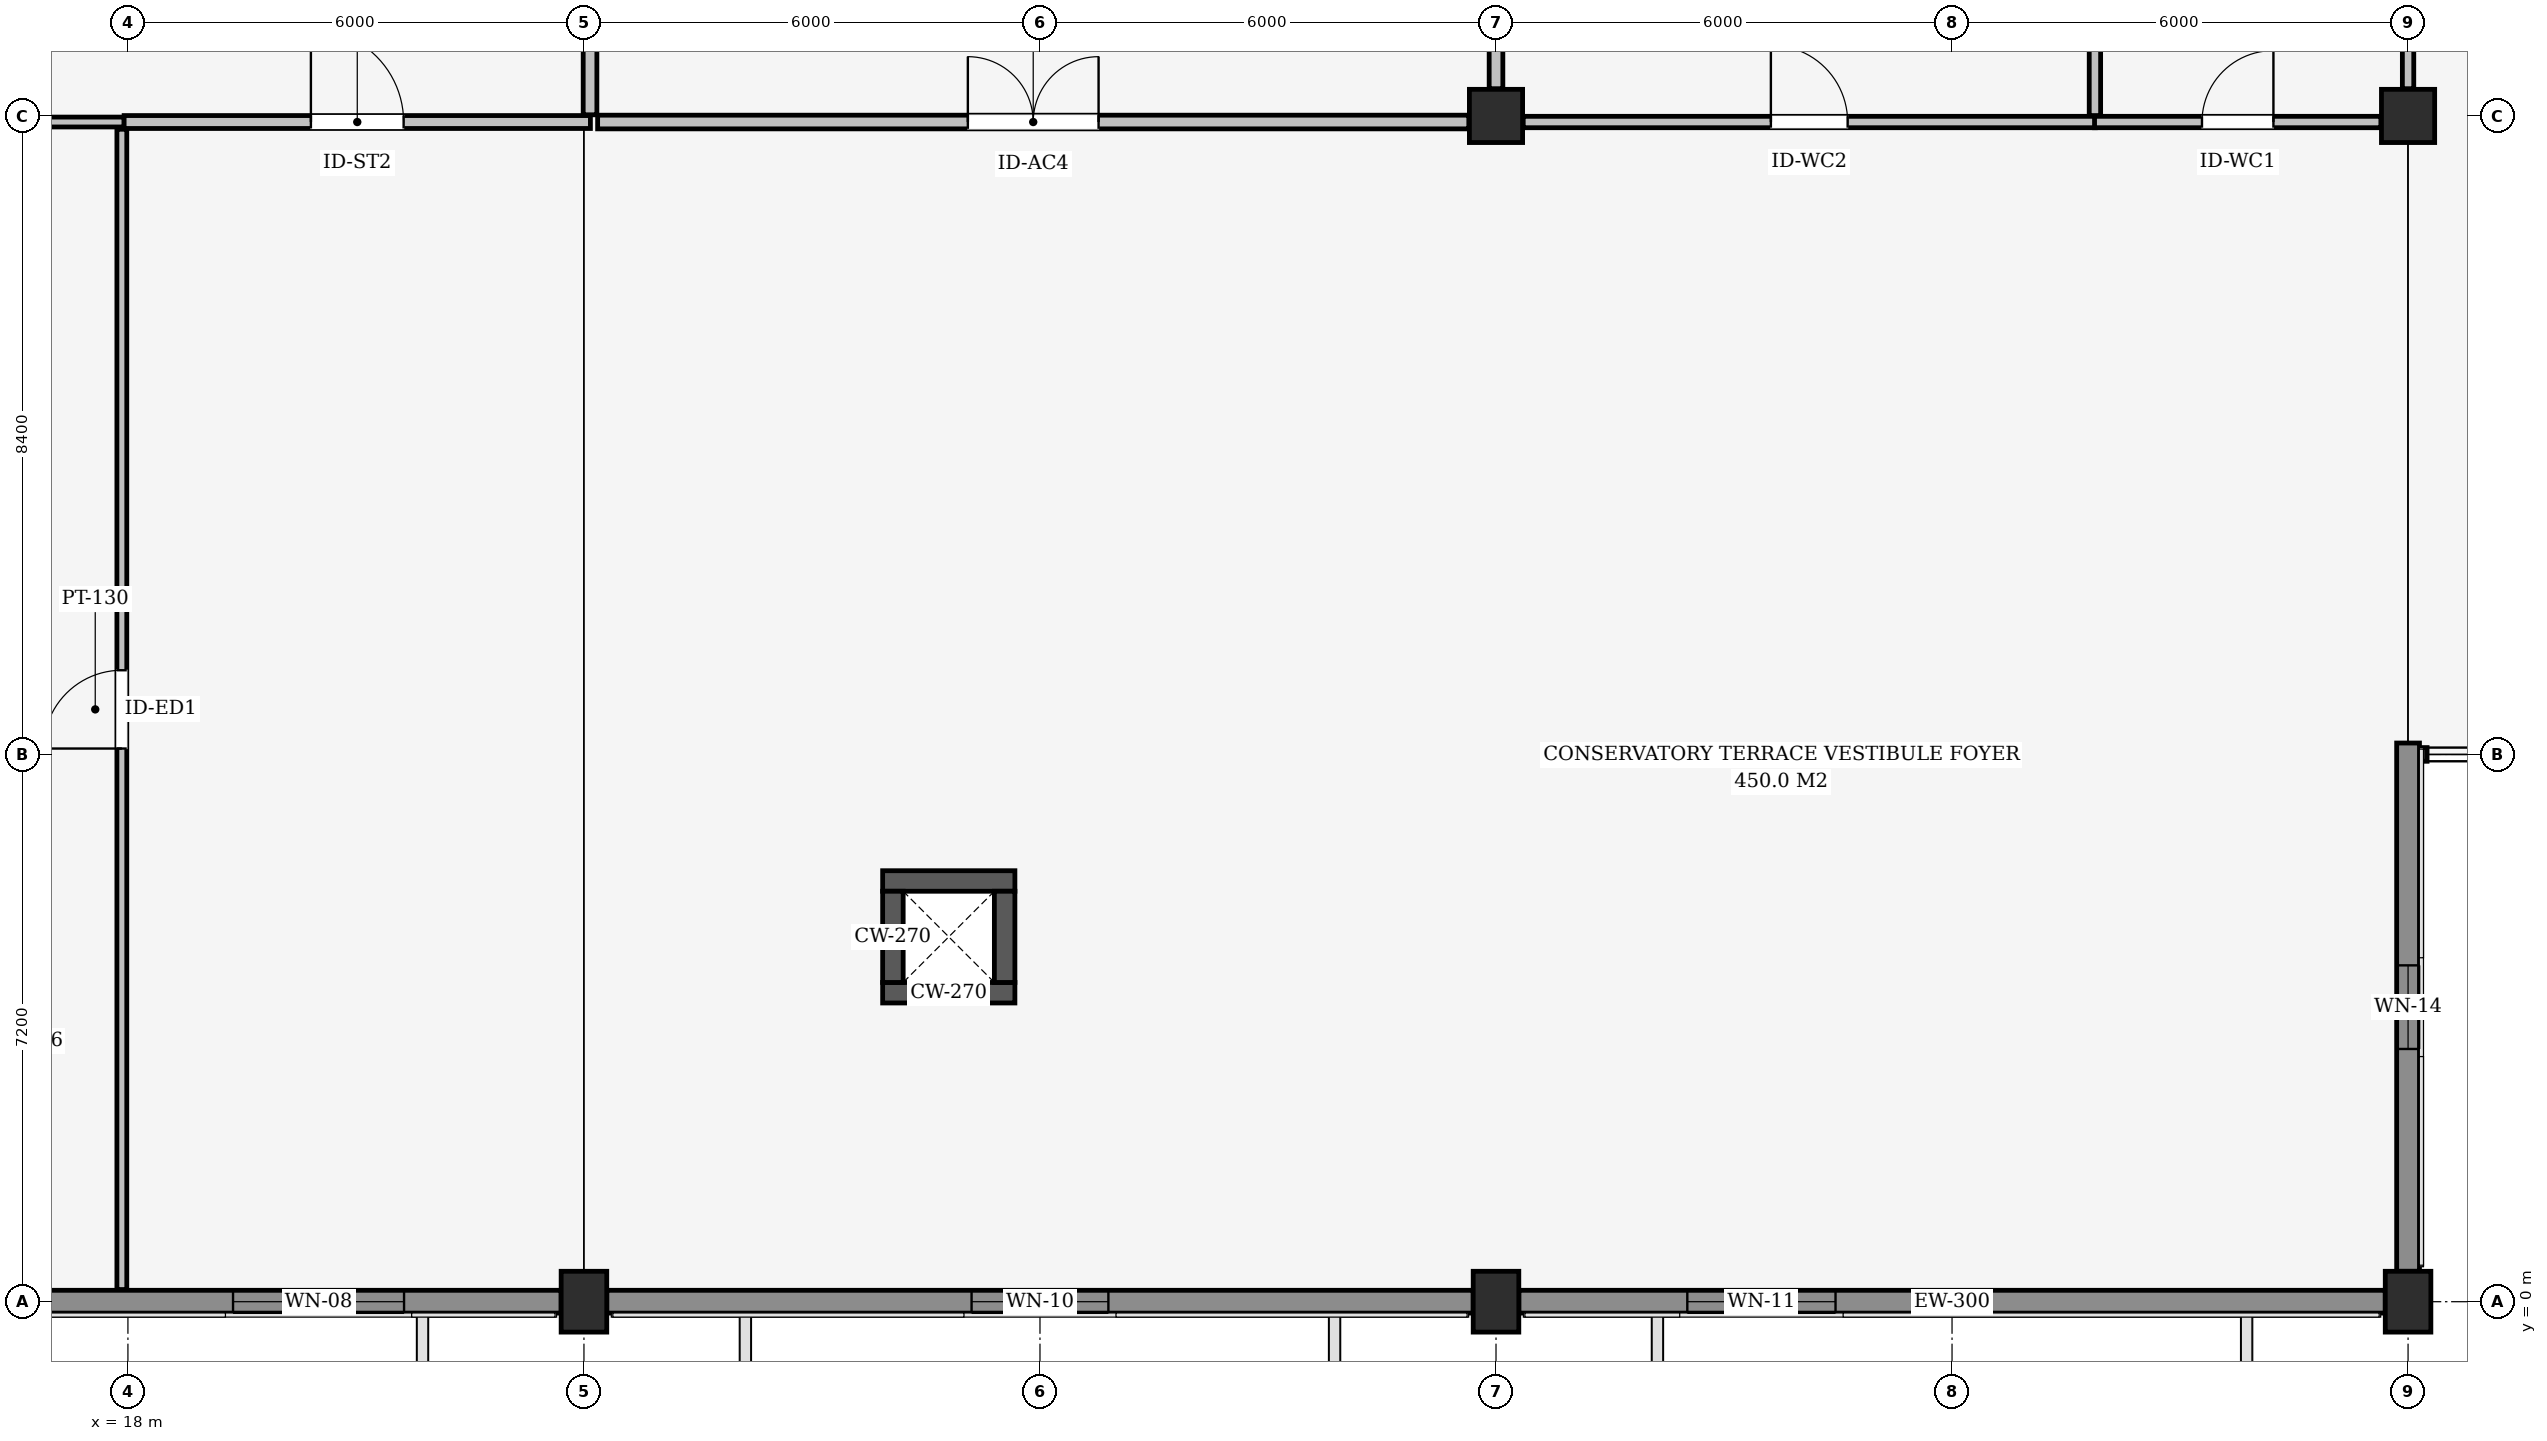
"""IFC4 building model, lengths in metres.
Left out: names, types, materials, properties, quantities, classifications, styles, units other than length and angle.
Written with IfcOpenShell. Run it as: python <this file> out.ifc"""

import sys

from ifc_helpers import new_model, si_unit, direction, frame, frame_2d, origin, origin_2d, place, context, subcontext, project, spatial, rectangle, extrude, element, fill, save


model = new_model("IFC4")
c1 = context("Model", 3, precision=1e-05, world=origin(), true_north=direction((0.0, 1.0)))
c2 = subcontext(c1, "Body", "Model", "MODEL_VIEW")
j1 = project(units=[si_unit("LENGTHUNIT", "METRE"), si_unit("PLANEANGLEUNIT", "RADIAN")], contexts=[c1])
p1 = place(None, origin())
s1 = spatial("IfcSite", under=j1, at=p1, CompositionType="ELEMENT")
p2 = place(p1, origin())
s2 = spatial("IfcBuilding", under=s1, at=p2, CompositionType="ELEMENT")
p3 = place(p2, frame((0.0, 0.0, 9.3)))
s3 = spatial("IfcBuildingStorey", under=s2, at=p3, CompositionType="ELEMENT", Elevation=9.3)
for number, where, z_axis, x_axis in (
    (1, (24.0, 0.0, 0.0), (0.0, 0.0, 1.0), (1.0, 0.0, 0.0)),
    (2, (36.0, 0.0, 0.0), (0.0, 0.0, 1.0), (1.0, 0.0, 0.0)),
    (3, (48.0, 0.0, 0.0), (0.0, 0.0, 1.0), (1.0, 0.0, 0.0)),
):
    element("IfcColumn", number, at=place(p3, frame(where, z_axis=z_axis, x_axis=x_axis)), inside=s3, PredefinedType="COLUMN", context=c2, shape_type="SweptSolid", body=[
        extrude(rectangle(XDim=0.6, YDim=0.8, at=origin_2d()), origin(), (0.0, 0.0, 1.0), 4.5),
    ])
for number, where, z_axis, x_axis in (
    (4, (36.0, 15.6, 0.0), (0.0, 0.0, 1.0), (1.0, 0.0, 0.0)),
    (5, (48.0, 15.6, 0.0), (0.0, 0.0, 1.0), (1.0, 0.0, 0.0)),
):
    element("IfcColumn", number, at=place(p3, frame(where, z_axis=z_axis, x_axis=x_axis)), inside=s3, PredefinedType="COLUMN", context=c2, shape_type="SweptSolid", body=[
        extrude(rectangle(XDim=0.7, YDim=0.7, at=origin_2d()), origin(), (0.0, 0.0, 1.0), 4.5),
    ])
p4 = place(p3, frame((23.7, 0.0, 0.0), z_axis=(0.0, 0.0, 1.0), x_axis=(-1.0, 0.0, 0.0)))
e6 = element("IfcWall", 6, at=p4, inside=s3, PredefinedType="SOLIDWALL", context=c2, shape_type="SweptSolid", body=[
    extrude(rectangle(XDim=11.4, YDim=0.3, at=frame_2d((5.7, 0.0))), origin(), (0.0, 0.0, 1.0), 3.873),
])
p5 = place(p4, frame((2.067, 0.0, 0.85)))
e7 = element("IfcOpeningElement", 7, at=p5, cuts=e6, PredefinedType="OPENING", context=c2, shape_type="SweptSolid", body=[
    extrude(rectangle(XDim=2.25, YDim=1.95, at=frame_2d((1.125, 0.975))), frame((0.0, 0.16, 0.0), z_axis=(0.0, -1.0, 0.0), x_axis=(1.0, 0.0, 0.0)), (0.0, 0.0, 1.0), 0.32),
])
p6 = place(p3, frame((35.7, 0.0, 0.0), z_axis=(0.0, 0.0, 1.0), x_axis=(-1.0, 0.0, 0.0)))
e8 = element("IfcWall", 8, at=p6, inside=s3, PredefinedType="SOLIDWALL", context=c2, shape_type="SweptSolid", body=[
    extrude(rectangle(XDim=11.4, YDim=0.3, at=frame_2d((5.7, 0.0))), origin(), (0.0, 0.0, 1.0), 3.873),
])
p7 = place(p6, frame((4.8, 0.0, 0.85)))
e9 = element("IfcOpeningElement", 9, at=p7, cuts=e8, PredefinedType="OPENING", context=c2, shape_type="SweptSolid", body=[
    extrude(rectangle(XDim=1.8, YDim=0.95, at=frame_2d((0.9, 0.475))), frame((0.0, 0.16, 0.0), z_axis=(0.0, -1.0, 0.0), x_axis=(1.0, 0.0, 0.0)), (0.0, 0.0, 1.0), 0.32),
])
p8 = place(p3, frame((47.7, 0.0, 0.0), z_axis=(0.0, 0.0, 1.0), x_axis=(-1.0, 0.0, 0.0)))
e10 = element("IfcWall", 10, at=p8, inside=s3, PredefinedType="SOLIDWALL", context=c2, shape_type="SweptSolid", body=[
    extrude(rectangle(XDim=11.4, YDim=0.3, at=frame_2d((5.7, 0.0))), origin(), (0.0, 0.0, 1.0), 3.873),
])
p9 = place(p8, frame((7.233, 0.0, 0.85)))
e11 = element("IfcOpeningElement", 11, at=p9, cuts=e10, PredefinedType="OPENING", context=c2, shape_type="SweptSolid", body=[
    extrude(rectangle(XDim=1.95, YDim=1.75, at=frame_2d((0.975, 0.875))), frame((0.0, 0.16, 0.0), z_axis=(0.0, -1.0, 0.0), x_axis=(1.0, 0.0, 0.0)), (0.0, 0.0, 1.0), 0.32),
])
p10 = place(p3, frame((48.0, 7.35, 0.0), z_axis=(0.0, 0.0, 1.0), x_axis=(0.0, -1.0, 0.0)))
e12 = element("IfcWall", 12, at=p10, inside=s3, PredefinedType="SOLIDWALL", context=c2, shape_type="SweptSolid", body=[
    extrude(rectangle(XDim=6.95, YDim=0.3, at=frame_2d((3.475, 0.0))), origin(), (0.0, 0.0, 1.0), 3.504),
])
p11 = place(p10, frame((2.925, 0.0, 0.6)))
e13 = element("IfcOpeningElement", 13, at=p11, cuts=e12, PredefinedType="OPENING", context=c2, shape_type="SweptSolid", body=[
    extrude(rectangle(XDim=1.1, YDim=2.4, at=frame_2d((0.55, 1.2))), frame((0.0, 0.16, 0.0), z_axis=(0.0, -1.0, 0.0), x_axis=(1.0, 0.0, 0.0)), (0.0, 0.0, 1.0), 0.32),
])
for number, where, z_axis, x_axis in (
    (14, (27.93, 4.065, 0.0), (0.0, 0.0, 1.0), (1.0, 0.0, 0.0)),
    (15, (27.93, 5.535, 0.0), (0.0, 0.0, 1.0), (1.0, 0.0, 0.0)),
):
    element("IfcWall", number, at=place(p3, frame(where, z_axis=z_axis, x_axis=x_axis)), inside=s3, PredefinedType="SHEAR", context=c2, shape_type="SweptSolid", body=[
        extrude(rectangle(XDim=1.74, YDim=0.27, at=frame_2d((0.87, 0.0))), origin(), (0.0, 0.0, 1.0), 4.5),
    ])
for number, where, z_axis, x_axis in (
    (16, (28.065, 4.2, 0.0), (0.0, 0.0, 1.0), (0.0, 1.0, 0.0)),
    (17, (29.535, 4.2, 0.0), (0.0, 0.0, 1.0), (0.0, 1.0, 0.0)),
):
    element("IfcWall", number, at=place(p3, frame(where, z_axis=z_axis, x_axis=x_axis)), inside=s3, PredefinedType="SHEAR", context=c2, shape_type="SweptSolid", body=[
        extrude(rectangle(XDim=1.2, YDim=0.27, at=frame_2d((0.6, 0.0))), origin(), (0.0, 0.0, 1.0), 4.5),
    ])
p12 = place(p3, frame((12.358, 15.52, 0.0), z_axis=(0.0, 0.0, 1.0), x_axis=(1.0, 0.0, 0.0)))
e18 = element("IfcWall", 18, at=p12, inside=s3, PredefinedType="PARTITIONING", context=c2, shape_type="SweptSolid", body=[
    extrude(rectangle(XDim=5.592, YDim=0.13, at=frame_2d((2.796, 0.0))), origin(), (0.0, 0.0, 1.0), 3.18),
])
p13 = place(p12, frame((2.281, 0.0, 0.0)))
e19 = element("IfcOpeningElement", 19, at=p13, cuts=e18, PredefinedType="OPENING", context=c2, shape_type="SweptSolid", body=[
    extrude(rectangle(XDim=1.03, YDim=2.18, at=frame_2d((0.515, 1.09))), frame((0.0, 0.075, 0.0), z_axis=(0.0, -1.0, 0.0), x_axis=(1.0, 0.0, 0.0)), (0.0, 0.0, 1.0), 0.15),
])
p14 = place(p3, frame((17.95, 15.52, 0.0), z_axis=(0.0, 0.0, 1.0), x_axis=(1.0, 0.0, 0.0)))
e20 = element("IfcWall", 20, at=p14, inside=s3, PredefinedType="PARTITIONING", context=c2, shape_type="SweptSolid", body=[
    extrude(rectangle(XDim=6.135, YDim=0.17, at=frame_2d((3.067, 0.0))), origin(), (0.0, 0.0, 1.0), 3.18),
])
p15 = place(p14, frame((2.458, 0.0, 0.0)))
e21 = element("IfcOpeningElement", 21, at=p15, cuts=e20, PredefinedType="OPENING", context=c2, shape_type="SweptSolid", body=[
    extrude(rectangle(XDim=1.22, YDim=2.18, at=frame_2d((0.61, 1.09))), frame((0.0, 0.095, 0.0), z_axis=(0.0, -1.0, 0.0), x_axis=(1.0, 0.0, 0.0)), (0.0, 0.0, 1.0), 0.19),
])
p16 = place(p3, frame((24.08, 15.615, 0.0), z_axis=(0.0, 0.0, 1.0), x_axis=(0.0, 1.0, 0.0)))
e22 = element("IfcWall", 22, at=p16, inside=s3, PredefinedType="PARTITIONING", context=c2, shape_type="SweptSolid", body=[
    extrude(rectangle(XDim=14.59, YDim=0.18, at=frame_2d((7.295, 0.0))), origin(), (0.0, 0.0, 1.0), 3.944),
])
p17 = place(p16, frame((6.435, 0.0, 0.0)))
e23 = element("IfcOpeningElement", 23, at=p17, cuts=e22, PredefinedType="OPENING", context=c2, shape_type="SweptSolid", body=[
    extrude(rectangle(XDim=1.72, YDim=2.34, at=frame_2d((0.86, 1.17))), frame((0.0, 0.1, 0.0), z_axis=(0.0, -1.0, 0.0), x_axis=(1.0, 0.0, 0.0)), (0.0, 0.0, 1.0), 0.2),
])
p18 = place(p3, frame((17.92, 0.16, 0.0), z_axis=(0.0, 0.0, 1.0), x_axis=(0.0, 1.0, 0.0)))
e24 = element("IfcWall", 24, at=p18, inside=s3, PredefinedType="PARTITIONING", context=c2, shape_type="SweptSolid", body=[
    extrude(rectangle(XDim=15.265, YDim=0.13, at=frame_2d((7.633, 0.0))), origin(), (0.0, 0.0, 1.0), 4.5),
])
p19 = place(p18, frame((7.117, 0.0, 0.0)))
e25 = element("IfcOpeningElement", 25, at=p19, cuts=e24, PredefinedType="OPENING", context=c2, shape_type="SweptSolid", body=[
    extrude(rectangle(XDim=1.03, YDim=2.18, at=frame_2d((0.515, 1.09))), frame((0.0, 0.075, 0.0), z_axis=(0.0, -1.0, 0.0), x_axis=(1.0, 0.0, 0.0)), (0.0, 0.0, 1.0), 0.15),
])
p20 = place(p3, frame((24.18, 15.52, 0.0), z_axis=(0.0, 0.0, 1.0), x_axis=(1.0, 0.0, 0.0)))
e26 = element("IfcWall", 26, at=p20, inside=s3, PredefinedType="PARTITIONING", context=c2, shape_type="SweptSolid", body=[
    extrude(rectangle(XDim=11.462, YDim=0.18, at=frame_2d((5.731, 0.0))), origin(), (0.0, 0.0, 1.0), 3.18),
])
p21 = place(p20, frame((4.871, 0.0, 0.0)))
e27 = element("IfcOpeningElement", 27, at=p21, cuts=e26, PredefinedType="OPENING", context=c2, shape_type="SweptSolid", body=[
    extrude(rectangle(XDim=1.72, YDim=2.34, at=frame_2d((0.86, 1.17))), frame((0.0, 0.1, 0.0), z_axis=(0.0, -1.0, 0.0), x_axis=(1.0, 0.0, 0.0)), (0.0, 0.0, 1.0), 0.2),
])
p22 = place(p3, frame((36.358, 15.52, 0.0), z_axis=(0.0, 0.0, 1.0), x_axis=(1.0, 0.0, 0.0)))
e28 = element("IfcWall", 28, at=p22, inside=s3, PredefinedType="PARTITIONING", context=c2, shape_type="SweptSolid", body=[
    extrude(rectangle(XDim=7.527, YDim=0.15, at=frame_2d((3.764, 0.0))), origin(), (0.0, 0.0, 1.0), 3.873),
])
p23 = place(p22, frame((3.259, 0.0, 0.0)))
e29 = element("IfcOpeningElement", 29, at=p23, cuts=e28, PredefinedType="OPENING", context=c2, shape_type="SweptSolid", body=[
    extrude(rectangle(XDim=1.01, YDim=2.1, at=frame_2d((0.505, 1.05))), frame((0.0, 0.085, 0.0), z_axis=(0.0, -1.0, 0.0), x_axis=(1.0, 0.0, 0.0)), (0.0, 0.0, 1.0), 0.17),
])
p24 = place(p3, frame((43.875, 15.52, 0.0), z_axis=(0.0, 0.0, 1.0), x_axis=(1.0, 0.0, 0.0)))
e30 = element("IfcWall", 30, at=p24, inside=s3, PredefinedType="PARTITIONING", context=c2, shape_type="SweptSolid", body=[
    extrude(rectangle(XDim=3.767, YDim=0.15, at=frame_2d((1.884, 0.0))), origin(), (0.0, 0.0, 1.0), 3.873),
])
p25 = place(p24, frame((1.414, 0.0, 0.0)))
e31 = element("IfcOpeningElement", 31, at=p25, cuts=e30, PredefinedType="OPENING", context=c2, shape_type="SweptSolid", body=[
    extrude(rectangle(XDim=0.94, YDim=2.1, at=frame_2d((0.47, 1.05))), frame((0.0, 0.085, 0.0), z_axis=(0.0, -1.0, 0.0), x_axis=(1.0, 0.0, 0.0)), (0.0, 0.0, 1.0), 0.17),
])
p26 = place(p3, frame((36.0, 15.958, 0.0), z_axis=(0.0, 0.0, 1.0), x_axis=(0.0, 1.0, 0.0)))
e32 = element("IfcWall", 32, at=p26, inside=s3, PredefinedType="PARTITIONING", context=c2, shape_type="SweptSolid", body=[
    extrude(rectangle(XDim=12.127, YDim=0.18, at=frame_2d((6.063, 0.0))), origin(), (0.0, 0.0, 1.0), 3.869),
])
p27 = place(p3, frame((43.88, 15.605, 0.0), z_axis=(0.0, 0.0, 1.0), x_axis=(0.0, 1.0, 0.0)))
e33 = element("IfcWall", 33, at=p27, inside=s3, PredefinedType="PARTITIONING", context=c2, shape_type="SweptSolid", body=[
    extrude(rectangle(XDim=6.48, YDim=0.15, at=frame_2d((3.24, 0.0))), origin(), (0.0, 0.0, 1.0), 4.5),
])
p28 = place(p3, frame((48.0, 15.958, 0.0), z_axis=(0.0, 0.0, 1.0), x_axis=(0.0, 1.0, 0.0)))
e34 = element("IfcWall", 34, at=p28, inside=s3, PredefinedType="PARTITIONING", context=c2, shape_type="SweptSolid", body=[
    extrude(rectangle(XDim=6.012, YDim=0.15, at=frame_2d((3.006, 0.0))), origin(), (0.0, 0.0, 1.0), 3.739),
])
p29 = place(p28, frame((2.536, 0.0, 0.0)))
e35 = element("IfcOpeningElement", 35, at=p29, cuts=e34, PredefinedType="OPENING", context=c2, shape_type="SweptSolid", body=[
    extrude(rectangle(XDim=0.94, YDim=2.1, at=frame_2d((0.47, 1.05))), frame((0.0, 0.085, 0.0), z_axis=(0.0, -1.0, 0.0), x_axis=(1.0, 0.0, 0.0)), (0.0, 0.0, 1.0), 0.17),
])
p30 = place(p5, origin())
e36 = element("IfcWindow", 36, at=p30, inside=s3, PartitioningType="SINGLE_PANEL", PredefinedType="WINDOW", context=c2, shape_type="SweptSolid", body=[
    extrude(rectangle(XDim=2.25, YDim=1.95, at=frame_2d((1.125, 0.975))), frame((0.0, 0.03, 0.0), z_axis=(0.0, -1.0, 0.0), x_axis=(1.0, 0.0, 0.0)), (0.0, 0.0, 1.0), 0.06),
])
fill(e7, e36)
p31 = place(p7, origin())
e37 = element("IfcWindow", 37, at=p31, inside=s3, PartitioningType="SINGLE_PANEL", PredefinedType="WINDOW", context=c2, shape_type="SweptSolid", body=[
    extrude(rectangle(XDim=1.8, YDim=0.95, at=frame_2d((0.9, 0.475))), frame((0.0, 0.03, 0.0), z_axis=(0.0, -1.0, 0.0), x_axis=(1.0, 0.0, 0.0)), (0.0, 0.0, 1.0), 0.06),
])
fill(e9, e37)
p32 = place(p9, origin())
e38 = element("IfcWindow", 38, at=p32, inside=s3, PartitioningType="SINGLE_PANEL", PredefinedType="WINDOW", context=c2, shape_type="SweptSolid", body=[
    extrude(rectangle(XDim=1.95, YDim=1.75, at=frame_2d((0.975, 0.875))), frame((0.0, 0.03, 0.0), z_axis=(0.0, -1.0, 0.0), x_axis=(1.0, 0.0, 0.0)), (0.0, 0.0, 1.0), 0.06),
])
fill(e11, e38)
p33 = place(p11, origin())
e39 = element("IfcWindow", 39, at=p33, inside=s3, PartitioningType="SINGLE_PANEL", PredefinedType="WINDOW", context=c2, shape_type="SweptSolid", body=[
    extrude(rectangle(XDim=1.1, YDim=2.4, at=frame_2d((0.55, 1.2))), frame((0.0, 0.03, 0.0), z_axis=(0.0, -1.0, 0.0), x_axis=(1.0, 0.0, 0.0)), (0.0, 0.0, 1.0), 0.06),
])
fill(e13, e39)
p34 = place(p15, origin())
e40 = element("IfcDoor", 40, at=p34, inside=s3, OperationType="SINGLE_SWING_LEFT", PredefinedType="DOOR", context=c2, shape_type="SweptSolid", body=[
    extrude(rectangle(XDim=1.22, YDim=2.18, at=frame_2d((0.61, 1.09))), frame((0.0, 0.025, 0.0), z_axis=(0.0, -1.0, 0.0), x_axis=(1.0, 0.0, 0.0)), (0.0, 0.0, 1.0), 0.05),
])
fill(e21, e40)
p35 = place(p19, origin())
e41 = element("IfcDoor", 41, at=p35, inside=s3, OperationType="SINGLE_SWING_LEFT", PredefinedType="DOOR", context=c2, shape_type="SweptSolid", body=[
    extrude(rectangle(XDim=1.03, YDim=2.18, at=frame_2d((0.515, 1.09))), frame((0.0, 0.025, 0.0), z_axis=(0.0, -1.0, 0.0), x_axis=(1.0, 0.0, 0.0)), (0.0, 0.0, 1.0), 0.05),
])
fill(e25, e41)
p36 = place(p21, origin())
e42 = element("IfcDoor", 42, at=p36, inside=s3, OperationType="DOUBLE_DOOR_SINGLE_SWING", PredefinedType="DOOR", context=c2, shape_type="SweptSolid", body=[
    extrude(rectangle(XDim=1.72, YDim=2.34, at=frame_2d((0.86, 1.17))), frame((0.0, 0.025, 0.0), z_axis=(0.0, -1.0, 0.0), x_axis=(1.0, 0.0, 0.0)), (0.0, 0.0, 1.0), 0.05),
])
fill(e27, e42)
p37 = place(p23, origin())
e43 = element("IfcDoor", 43, at=p37, inside=s3, OperationType="SINGLE_SWING_LEFT", PredefinedType="DOOR", context=c2, shape_type="SweptSolid", body=[
    extrude(rectangle(XDim=1.01, YDim=2.1, at=frame_2d((0.505, 1.05))), frame((0.0, 0.025, 0.0), z_axis=(0.0, -1.0, 0.0), x_axis=(1.0, 0.0, 0.0)), (0.0, 0.0, 1.0), 0.05),
])
fill(e29, e43)
p38 = place(p25, origin())
e44 = element("IfcDoor", 44, at=p38, inside=s3, OperationType="SINGLE_SWING_RIGHT", PredefinedType="DOOR", context=c2, shape_type="SweptSolid", body=[
    extrude(rectangle(XDim=0.94, YDim=2.1, at=frame_2d((0.47, 1.05))), frame((0.0, 0.025, 0.0), z_axis=(0.0, -1.0, 0.0), x_axis=(1.0, 0.0, 0.0)), (0.0, 0.0, 1.0), 0.05),
])
fill(e31, e44)
save(model, sys.argv[1])
